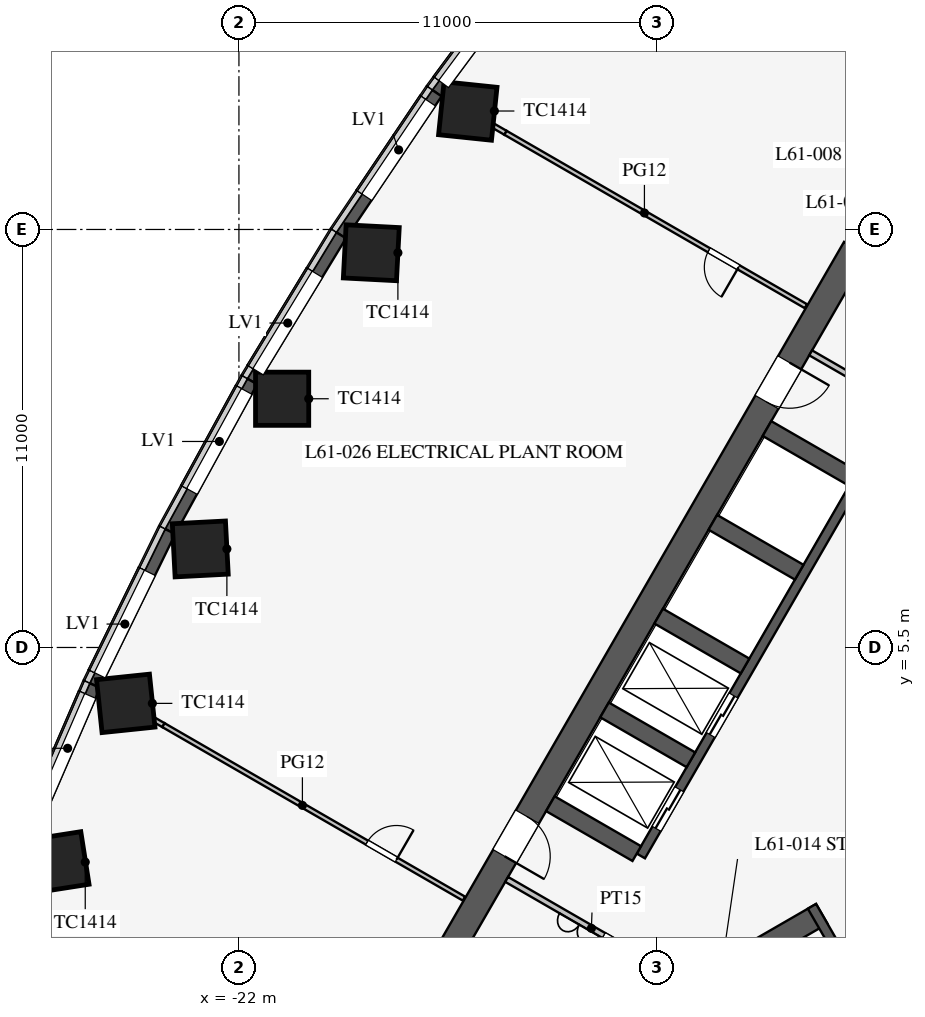
"""IFC4 building model, lengths in metres.
Left out: names, types, materials, properties, quantities, classifications, styles, units other than length and angle.
Written with IfcOpenShell. Run it as: python <this file> out.ifc"""

import sys

from ifc_helpers import new_model, si_unit, direction, frame, frame_2d, origin, origin_2d, place, context, subcontext, project, spatial, polyline, rectangle, outline, extrude, clip, halfspace, element, fill, save


model = new_model("IFC4")
c1 = context("Model", 3, precision=1e-05, world=origin(), true_north=direction((0.0, 1.0)))
c2 = subcontext(c1, "Body", "Model", "MODEL_VIEW")
j1 = project(units=[si_unit("LENGTHUNIT", "METRE"), si_unit("PLANEANGLEUNIT", "RADIAN")], contexts=[c1])
p1 = place(None, origin())
s1 = spatial("IfcSite", under=j1, at=p1, CompositionType="ELEMENT")
p2 = place(p1, origin())
s2 = spatial("IfcBuilding", under=s1, at=p2, CompositionType="ELEMENT")
p3 = place(p2, frame((0.0, 0.0, 265.3)))
s3 = spatial("IfcBuildingStorey", under=s2, at=p3, CompositionType="ELEMENT", Elevation=265.3)
p4 = place(p3, frame((-16.227, 19.761, 0.0), z_axis=(0.201282046639, -0.116233851942, 0.972612579275), x_axis=(-0.584672708009, -0.810911567532, 0.024088465132)))
e1 = element("IfcColumn", 1, at=p4, inside=s3, PredefinedType="COLUMN", context=c2, shape_type="Clipping", body=[
    clip(clip(extrude(rectangle(XDim=1.4, YDim=1.4, at=origin_2d()), origin(), (0.0, 0.0, 1.0), 6.169), halfspace(frame((0.0, 0.0, 0.185), z_axis=(-1.9384733546467386e-05, -1.123718108159144e-05, 0.999999999748979), x_axis=(0.0, 0.999999999936863, 1.1237181083702726e-05)), True)), halfspace(frame((0.0, 0.0, 5.984), z_axis=(1.9384733546467386e-05, 1.123718108159144e-05, -0.999999999748979), x_axis=(0.0, -0.999999999936863, -1.1237181083702726e-05)), True)),
])
p5 = place(p3, frame((-18.748, 16.02, 0.0), z_axis=(0.187766955789, -0.108401950994, 0.976213392315), x_axis=(-0.543261997309, -0.839487539175, 0.01127270373)))
e2 = element("IfcColumn", 2, at=p5, inside=s3, PredefinedType="COLUMN", context=c2, shape_type="Clipping", body=[
    clip(clip(extrude(rectangle(XDim=1.4, YDim=1.4, at=origin_2d()), origin(), (0.0, 0.0, 1.0), 6.146), halfspace(frame((0.0, 0.0, 0.164), z_axis=(5.122421756978066e-06, -9.263174689327915e-06, 0.9999999999439773), x_axis=(0.0, 0.9999999999570969, 9.263174689449444e-06)), True)), halfspace(frame((0.0, 0.0, 5.982), z_axis=(-5.122421756978066e-06, 9.263174689327915e-06, -0.9999999999439773), x_axis=(0.0, -0.9999999999570969, -9.263174689449444e-06)), True)),
])
p6 = place(p3, frame((-21.088, 12.175, 0.0), z_axis=(0.183254498096, -0.105784931626, 0.977357323177), x_axis=(-0.499939380126, -0.866060399857, 0.0)))
e3 = element("IfcColumn", 3, at=p6, inside=s3, PredefinedType="COLUMN", context=c2, shape_type="Clipping", body=[
    clip(clip(extrude(rectangle(XDim=1.4, YDim=1.4, at=origin_2d()), origin(), (0.0, 0.0, 1.0), 6.139), halfspace(frame((0.0, 0.0, 0.153), z_axis=(1.4810932677108633e-05, 8.35661905923546e-06, 0.9999999998554017), x_axis=(0.0, 0.9999999999650835, -8.356619060152029e-06)), True)), halfspace(frame((0.0, 0.0, 5.986), z_axis=(-1.4810932677108633e-05, -8.35661905923546e-06, -0.9999999998554017), x_axis=(0.0, -0.9999999999650835, 8.356619060152029e-06)), True)),
])
p7 = place(p3, frame((-23.248, 8.226, 0.0), z_axis=(0.187766955789, -0.108401950994, 0.976213392315), x_axis=(-0.4553484777, -0.890241927797, -0.01127270373)))
e4 = element("IfcColumn", 4, at=p7, inside=s3, PredefinedType="COLUMN", context=c2, shape_type="Clipping", body=[
    clip(clip(extrude(rectangle(XDim=1.4, YDim=1.4, at=origin_2d()), origin(), (0.0, 0.0, 1.0), 6.146), halfspace(frame((0.0, 0.0, 0.164), z_axis=(4.132789407884988e-06, -9.745032667568544e-06, 0.9999999999439773), x_axis=(0.0, 0.9999999999525172, 9.745032667651767e-06)), True)), halfspace(frame((0.0, 0.0, 5.982), z_axis=(-4.132789407884988e-06, 9.745032667568544e-06, -0.9999999999439773), x_axis=(0.0, -0.9999999999525172, -9.745032667651767e-06)), True)),
])
p8 = place(p3, frame((-25.227, 4.172, 0.0), z_axis=(0.201282046639, -0.116233851942, 0.972612579275), x_axis=(-0.410094064626, -0.911725070406, -0.024088465132)))
e5 = element("IfcColumn", 5, at=p8, inside=s3, PredefinedType="COLUMN", context=c2, shape_type="Clipping", body=[
    clip(clip(extrude(rectangle(XDim=1.4, YDim=1.4, at=origin_2d()), origin(), (0.0, 0.0, 1.0), 6.169), halfspace(frame((0.0, 0.0, 0.185), z_axis=(-2.1284951141970626e-05, -6.9994991401256534e-06, 0.999999999748979), x_axis=(0.0, 0.9999999999755035, 6.999499141711211e-06)), True)), halfspace(frame((0.0, 0.0, 5.984), z_axis=(2.1284951141970626e-05, 6.9994991401256534e-06, -0.999999999748979), x_axis=(0.0, -0.9999999999755035, -6.999499141711211e-06)), True)),
])
p9 = place(p3, frame((-27.022, 0.013, 0.0), z_axis=(0.223891049085, -0.129279785892, 0.96600182976), x_axis=(-0.364788927644, -0.930232982642, -0.03994541618)))
e6 = element("IfcColumn", 6, at=p9, inside=s3, PredefinedType="COLUMN", context=c2, shape_type="Clipping", body=[
    clip(clip(extrude(rectangle(XDim=1.4, YDim=1.4, at=origin_2d()), origin(), (0.0, 0.0, 1.0), 6.211), halfspace(frame((0.0, 0.0, 0.215), z_axis=(-1.7703553432418806e-05, -2.2252505130410105e-05, 0.9999999995957052), x_axis=(0.0, 0.999999999752413, 2.2252505133897248e-05)), True)), halfspace(frame((0.0, 0.0, 5.996), z_axis=(1.7703553432418806e-05, 2.2252505130410105e-05, -0.9999999995957052), x_axis=(0.0, -0.999999999752413, -2.2252505133897248e-05)), True)),
])
p10 = place(p3, frame((-5.773, 16.0, 0.0), z_axis=(0.0, 0.0, 1.0), x_axis=(-0.500002442456, -0.866023993627, 0.0)))
e7 = element("IfcWall", 7, at=p10, inside=s3, PredefinedType="SHEAR", context=c2, shape_type="SweptSolid", body=[
    extrude(rectangle(XDim=21.939, YDim=0.7, at=frame_2d((10.97, 0.0))), origin(), (0.0, 0.0, 1.0), 6.0),
])
p11 = place(p10, frame((17.27, 0.0, 0.0)))
e8 = element("IfcOpeningElement", 8, at=p11, cuts=e7, PredefinedType="OPENING", context=c2, shape_type="SweptSolid", body=[
    extrude(rectangle(XDim=1.2, YDim=2.1, at=frame_2d((0.6, 1.05))), frame((0.0, 0.36, 0.0), z_axis=(0.0, -1.0, 0.0), x_axis=(1.0, 0.0, 0.0)), (0.0, 0.0, 1.0), 0.72),
])
p12 = place(p10, frame((3.47, 0.0, 0.0)))
e9 = element("IfcOpeningElement", 9, at=p12, cuts=e7, PredefinedType="OPENING", context=c2, shape_type="SweptSolid", body=[
    extrude(rectangle(XDim=1.2, YDim=2.1, at=frame_2d((0.6, 1.05))), frame((0.0, 0.36, 0.0), z_axis=(0.0, -1.0, 0.0), x_axis=(1.0, 0.0, 0.0)), (0.0, 0.0, 1.0), 0.72),
])
p13 = place(p3, frame((-5.724, 9.886, 0.0), z_axis=(0.0, 0.0, 1.0), x_axis=(-0.500001763848, -0.866024385424, 0.0)))
e10 = element("IfcWall", 10, at=p13, inside=s3, PredefinedType="SHEAR", context=c2, shape_type="SweptSolid", body=[
    extrude(rectangle(XDim=11.4, YDim=0.25, at=frame_2d((5.7, 0.0))), origin(), (0.0, 0.0, 1.0), 6.0),
])
p14 = place(p13, frame((6.525, 0.0, 0.0)))
e11 = element("IfcOpeningElement", 11, at=p14, cuts=e10, PredefinedType="OPENING", context=c2, shape_type="SweptSolid", body=[
    extrude(rectangle(XDim=1.2, YDim=2.2, at=frame_2d((0.6, 1.1))), frame((0.0, 0.135, 0.0), z_axis=(0.0, -1.0, 0.0), x_axis=(1.0, 0.0, 0.0)), (0.0, 0.0, 1.0), 0.27),
])
p15 = place(p13, frame((9.375, 0.0, 0.0)))
e12 = element("IfcOpeningElement", 12, at=p15, cuts=e10, PredefinedType="OPENING", context=c2, shape_type="SweptSolid", body=[
    extrude(rectangle(XDim=1.2, YDim=2.2, at=frame_2d((0.6, 1.1))), frame((0.0, 0.135, 0.0), z_axis=(0.0, -1.0, 0.0), x_axis=(1.0, 0.0, 0.0)), (0.0, 0.0, 1.0), 0.27),
])
for number, where, z_axis, x_axis in (
    (13, (-5.832, 9.949, 0.0), (0.0, 0.0, 1.0), (-0.866, 0.5, 0.0)),
    (14, (-7.257, 7.481, 0.0), (0.0, 0.0, 1.0), (-0.866, 0.5, 0.0)),
    (15, (-8.682, 5.012, 0.0), (0.0, 0.0, 1.0), (-0.866, 0.5, 0.0)),
    (16, (-10.107, 2.544, 0.0), (0.0, 0.0, 1.0), (-0.866, 0.5, 0.0)),
    (17, (-11.532, 0.076, 0.0), (0.0, 0.0, 1.0), (-0.866, 0.5, 0.0)),
):
    element("IfcWall", number, at=place(p3, frame(where, z_axis=z_axis, x_axis=x_axis)), inside=s3, PredefinedType="SHEAR", context=c2, shape_type="SweptSolid", body=[
        extrude(rectangle(XDim=2.625, YDim=0.45, at=frame_2d((1.312, 0.0))), origin(), (0.0, 0.0, 1.0), 6.0),
    ])
p16 = place(p3, frame((-6.663, -1.509, 0.0), z_axis=(0.0, 0.0, 1.0), x_axis=(-0.866028310072, -0.499994966129, 0.0)))
e18 = element("IfcWall", 18, at=p16, inside=s3, PredefinedType="SHEAR", context=c2, shape_type="SweptSolid", body=[
    extrude(rectangle(XDim=9.125, YDim=0.6, at=frame_2d((4.562, 0.0))), origin(), (0.0, 0.0, 1.0), 6.0),
])
p17 = place(p3, frame((-6.922, -1.312, 0.0), z_axis=(0.0, 0.0, 1.0), x_axis=(0.499984536904, -0.866034331223, 0.0)))
e19 = element("IfcWall", 19, at=p17, inside=s3, PredefinedType="SHEAR", context=c2, shape_type="SweptSolid", body=[
    extrude(rectangle(XDim=4.65, YDim=0.25, at=frame_2d((2.325, 0.0))), origin(), (0.0, 0.0, 1.0), 6.0),
])
p18 = place(p17, frame((1.525, 0.0, 0.0)))
e20 = element("IfcOpeningElement", 20, at=p18, cuts=e19, PredefinedType="OPENING", context=c2, shape_type="SweptSolid", body=[
    extrude(rectangle(XDim=1.6, YDim=2.1, at=frame_2d((0.8, 1.05))), frame((0.0, 0.135, 0.0), z_axis=(0.0, -1.0, 0.0), x_axis=(1.0, 0.0, 0.0)), (0.0, 0.0, 1.0), 0.27),
])
p19 = place(p3, frame((-14.092, 23.724, 0.0), z_axis=(0.0, 0.0, 1.0), x_axis=(-0.596173167565, -0.802855873912, 0.0)))
e21 = element("IfcWall", 21, at=p19, inside=s3, PredefinedType="SOLIDWALL", context=c2, shape_type="SweptSolid", body=[
    extrude(rectangle(XDim=4.53, YDim=0.3, at=frame_2d((2.265, 0.0))), origin(), (0.0, 0.0, 1.0), 5.8),
])
p20 = place(p19, frame((1.23, 0.0, 3.5)))
e22 = element("IfcOpeningElement", 22, at=p20, cuts=e21, PredefinedType="OPENING", context=c2, shape_type="SweptSolid", body=[
    extrude(rectangle(XDim=3.0, YDim=2.0, at=frame_2d((1.5, 1.0))), frame((0.0, 0.16, 0.0), z_axis=(0.0, -1.0, 0.0), x_axis=(1.0, 0.0, 0.0)), (0.0, 0.0, 1.0), 0.32),
])
p21 = place(p3, frame((-16.792, 20.087, 0.0), z_axis=(0.0, 0.0, 1.0), x_axis=(-0.558466624917, -0.829526991034, 0.0)))
e23 = element("IfcWall", 23, at=p21, inside=s3, PredefinedType="SOLIDWALL", context=c2, shape_type="SweptSolid", body=[
    extrude(rectangle(XDim=4.511, YDim=0.3, at=frame_2d((2.255, 0.0))), origin(), (0.0, 0.0, 1.0), 5.8),
])
p22 = place(p21, frame((0.3, 0.0, 3.5)))
e24 = element("IfcOpeningElement", 24, at=p22, cuts=e23, PredefinedType="OPENING", context=c2, shape_type="SweptSolid", body=[
    extrude(rectangle(XDim=3.0, YDim=2.0, at=frame_2d((1.5, 1.0))), frame((0.0, 0.16, 0.0), z_axis=(0.0, -1.0, 0.0), x_axis=(1.0, 0.0, 0.0)), (0.0, 0.0, 1.0), 0.32),
])
p23 = place(p3, frame((-19.312, 16.346, 0.0), z_axis=(0.0, 0.0, 1.0), x_axis=(-0.519766265397, -0.854308509472, 0.0)))
e25 = element("IfcWall", 25, at=p23, inside=s3, PredefinedType="SOLIDWALL", context=c2, shape_type="SweptSolid", body=[
    extrude(rectangle(XDim=4.501, YDim=0.3, at=frame_2d((2.25, 0.0))), origin(), (0.0, 0.0, 1.0), 5.8),
])
p24 = place(p23, frame((1.201, 0.0, 3.5)))
e26 = element("IfcOpeningElement", 26, at=p24, cuts=e25, PredefinedType="OPENING", context=c2, shape_type="SweptSolid", body=[
    extrude(rectangle(XDim=3.0, YDim=2.0, at=frame_2d((1.5, 1.0))), frame((0.0, 0.16, 0.0), z_axis=(0.0, -1.0, 0.0), x_axis=(1.0, 0.0, 0.0)), (0.0, 0.0, 1.0), 0.32),
])
p25 = place(p3, frame((-21.651, 12.5, 0.0), z_axis=(0.0, 0.0, 1.0), x_axis=(-0.479972822547, -0.877283357654, 0.0)))
e27 = element("IfcWall", 27, at=p25, inside=s3, PredefinedType="SOLIDWALL", context=c2, shape_type="SweptSolid", body=[
    extrude(rectangle(XDim=4.501, YDim=0.3, at=frame_2d((2.25, 0.0))), origin(), (0.0, 0.0, 1.0), 5.8),
])
p26 = place(p25, frame((0.3, 0.0, 3.5)))
e28 = element("IfcOpeningElement", 28, at=p26, cuts=e27, PredefinedType="OPENING", context=c2, shape_type="SweptSolid", body=[
    extrude(rectangle(XDim=3.0, YDim=2.0, at=frame_2d((1.5, 1.0))), frame((0.0, 0.16, 0.0), z_axis=(0.0, -1.0, 0.0), x_axis=(1.0, 0.0, 0.0)), (0.0, 0.0, 1.0), 0.32),
])
p27 = place(p3, frame((-23.812, 8.552, 0.0), z_axis=(0.0, 0.0, 1.0), x_axis=(-0.439163535873, -0.898407139753, 0.0)))
e29 = element("IfcWall", 29, at=p27, inside=s3, PredefinedType="SOLIDWALL", context=c2, shape_type="SweptSolid", body=[
    extrude(rectangle(XDim=4.511, YDim=0.3, at=frame_2d((2.255, 0.0))), origin(), (0.0, 0.0, 1.0), 5.8),
])
p28 = place(p27, frame((1.211, 0.0, 3.5)))
e30 = element("IfcOpeningElement", 30, at=p28, cuts=e29, PredefinedType="OPENING", context=c2, shape_type="SweptSolid", body=[
    extrude(rectangle(XDim=3.0, YDim=2.0, at=frame_2d((1.5, 1.0))), frame((0.0, 0.16, 0.0), z_axis=(0.0, -1.0, 0.0), x_axis=(1.0, 0.0, 0.0)), (0.0, 0.0, 1.0), 0.32),
])
p29 = place(p3, frame((-25.792, 4.499, 0.0), z_axis=(0.0, 0.0, 1.0), x_axis=(-0.397208101111, -0.917728567939, 0.0)))
e31 = element("IfcWall", 31, at=p29, inside=s3, PredefinedType="SOLIDWALL", context=c2, shape_type="SweptSolid", body=[
    extrude(rectangle(XDim=4.53, YDim=0.3, at=frame_2d((2.265, 0.0))), origin(), (0.0, 0.0, 1.0), 5.8),
])
p30 = place(p29, frame((0.3, 0.0, 3.5)))
e32 = element("IfcOpeningElement", 32, at=p30, cuts=e31, PredefinedType="OPENING", context=c2, shape_type="SweptSolid", body=[
    extrude(rectangle(XDim=3.0, YDim=2.0, at=frame_2d((1.5, 1.0))), frame((0.0, 0.16, 0.0), z_axis=(0.0, -1.0, 0.0), x_axis=(1.0, 0.0, 0.0)), (0.0, 0.0, 1.0), 0.32),
])
p31 = place(p3, frame((-10.495, -3.178, 0.0), z_axis=(0.0, 0.0, 1.0), x_axis=(-0.866037967349, 0.499978238636, 0.0)))
e33 = element("IfcWall", 33, at=p31, inside=s3, PredefinedType="PARTITIONING", context=c2, shape_type="SweptSolid", body=[
    extrude(rectangle(XDim=5.15, YDim=0.15, at=frame_2d((2.575, 0.0))), origin(), (0.0, 0.0, 1.0), 5.8),
])
p32 = place(p31, frame((1.3, 0.0, 0.0)))
e34 = element("IfcOpeningElement", 34, at=p32, cuts=e33, PredefinedType="OPENING", context=c2, shape_type="SweptSolid", body=[
    extrude(rectangle(XDim=0.9, YDim=2.1, at=frame_2d((0.45, 1.05))), frame((0.0, 0.085, 0.0), z_axis=(0.0, -1.0, 0.0), x_axis=(1.0, 0.0, 0.0)), (0.0, 0.0, 1.0), 0.17),
])
p33 = place(p3, frame((-2.495, 10.678, 0.0), z_axis=(0.0, 0.0, 1.0), x_axis=(-0.866037967349, 0.499978238636, 0.0)))
e35 = element("IfcWall", 35, at=p33, inside=s3, PredefinedType="PARTITIONING", context=c2, shape_type="SweptSolid", body=[
    extrude(rectangle(XDim=5.15, YDim=0.15, at=frame_2d((2.575, 0.0))), origin(), (0.0, 0.0, 1.0), 5.8),
])
p34 = place(p33, frame((2.6, 0.0, 0.0)))
e36 = element("IfcOpeningElement", 36, at=p34, cuts=e35, PredefinedType="OPENING", context=c2, shape_type="SweptSolid", body=[
    extrude(rectangle(XDim=0.9, YDim=2.1, at=frame_2d((0.45, 1.05))), frame((0.0, 0.085, 0.0), z_axis=(0.0, -1.0, 0.0), x_axis=(1.0, 0.0, 0.0)), (0.0, 0.0, 1.0), 0.17),
])
p35 = place(p3, frame((-23.986, 3.456, 0.0), z_axis=(0.0, 0.0, 1.0), x_axis=(-0.866138304741, 0.499804398801, 0.0)))
e37 = element("IfcWall", 37, at=p35, inside=s3, PredefinedType="PARTITIONING", context=c2, shape_type="SweptSolid", body=[
    extrude(outline(polyline([(0.0, 0.0), (0.688, 0.0), (0.688, 0.05), (0.0, 2.9), (0.0, 0.0)])), frame((0.0, 0.06, 0.0), z_axis=(0.0, -1.0, 0.0), x_axis=(1.0, 0.0, 0.0)), (0.0, 0.0, 1.0), 0.12),
])
p36 = place(p3, frame((-14.986, 19.044, 0.0), z_axis=(0.0, 0.0, 1.0), x_axis=(-0.865984622623, 0.500070628392, 0.0)))
e38 = element("IfcWall", 38, at=p36, inside=s3, PredefinedType="PARTITIONING", context=c2, shape_type="SweptSolid", body=[
    extrude(outline(polyline([(0.0, 0.0), (0.688, 0.0), (0.688, 0.05), (0.0, 2.9), (0.0, 0.0)])), frame((0.0, 0.06, 0.0), z_axis=(0.0, -1.0, 0.0), x_axis=(1.0, 0.0, 0.0)), (0.0, 0.0, 1.0), 0.12),
])
p37 = place(p3, frame((-16.079, -1.109, 0.0), z_axis=(0.0, 0.0, 1.0), x_axis=(-0.866026165896, 0.499998679983, 0.0)))
e39 = element("IfcWall", 39, at=p37, inside=s3, PredefinedType="PARTITIONING", context=c2, shape_type="SweptSolid", body=[
    extrude(rectangle(XDim=9.13, YDim=0.12, at=frame_2d((4.565, 0.0))), origin(), (0.0, 0.0, 1.0), 2.9),
])
p38 = place(p37, frame((2.05, 0.0, 0.0)))
e40 = element("IfcOpeningElement", 40, at=p38, cuts=e39, PredefinedType="OPENING", context=c2, shape_type="SweptSolid", body=[
    extrude(rectangle(XDim=0.9, YDim=2.1, at=frame_2d((0.45, 1.05))), frame((0.0, 0.07, 0.0), z_axis=(0.0, -1.0, 0.0), x_axis=(1.0, 0.0, 0.0)), (0.0, 0.0, 1.0), 0.14),
])
p39 = place(p3, frame((-7.079, 14.479, 0.0), z_axis=(0.0, 0.0, 1.0), x_axis=(-0.866026165896, 0.499998679983, 0.0)))
e41 = element("IfcWall", 41, at=p39, inside=s3, PredefinedType="PARTITIONING", context=c2, shape_type="SweptSolid", body=[
    extrude(rectangle(XDim=9.13, YDim=0.12, at=frame_2d((4.565, 0.0))), origin(), (0.0, 0.0, 1.0), 2.9),
])
p40 = place(p39, frame((2.05, 0.0, 0.0)))
e42 = element("IfcOpeningElement", 42, at=p40, cuts=e41, PredefinedType="OPENING", context=c2, shape_type="SweptSolid", body=[
    extrude(rectangle(XDim=0.9, YDim=2.1, at=frame_2d((0.45, 1.05))), frame((0.0, 0.07, 0.0), z_axis=(0.0, -1.0, 0.0), x_axis=(1.0, 0.0, 0.0)), (0.0, 0.0, 1.0), 0.14),
])
p41 = place(p20, origin())
e43 = element("IfcWindow", 43, at=p41, inside=s3, PartitioningType="SINGLE_PANEL", PredefinedType="USERDEFINED", context=c2, shape_type="SweptSolid", body=[
    extrude(rectangle(XDim=3.0, YDim=2.0, at=frame_2d((1.5, 1.0))), frame((0.0, 0.03, 0.0), z_axis=(0.0, -1.0, 0.0), x_axis=(1.0, 0.0, 0.0)), (0.0, 0.0, 1.0), 0.06),
])
fill(e22, e43)
p42 = place(p22, origin())
e44 = element("IfcWindow", 44, at=p42, inside=s3, PartitioningType="SINGLE_PANEL", PredefinedType="USERDEFINED", context=c2, shape_type="SweptSolid", body=[
    extrude(rectangle(XDim=3.0, YDim=2.0, at=frame_2d((1.5, 1.0))), frame((0.0, 0.03, 0.0), z_axis=(0.0, -1.0, 0.0), x_axis=(1.0, 0.0, 0.0)), (0.0, 0.0, 1.0), 0.06),
])
fill(e24, e44)
p43 = place(p24, origin())
e45 = element("IfcWindow", 45, at=p43, inside=s3, PartitioningType="SINGLE_PANEL", PredefinedType="USERDEFINED", context=c2, shape_type="SweptSolid", body=[
    extrude(rectangle(XDim=3.0, YDim=2.0, at=frame_2d((1.5, 1.0))), frame((0.0, 0.03, 0.0), z_axis=(0.0, -1.0, 0.0), x_axis=(1.0, 0.0, 0.0)), (0.0, 0.0, 1.0), 0.06),
])
fill(e26, e45)
p44 = place(p26, origin())
e46 = element("IfcWindow", 46, at=p44, inside=s3, PartitioningType="SINGLE_PANEL", PredefinedType="USERDEFINED", context=c2, shape_type="SweptSolid", body=[
    extrude(rectangle(XDim=3.0, YDim=2.0, at=frame_2d((1.5, 1.0))), frame((0.0, 0.03, 0.0), z_axis=(0.0, -1.0, 0.0), x_axis=(1.0, 0.0, 0.0)), (0.0, 0.0, 1.0), 0.06),
])
fill(e28, e46)
p45 = place(p28, origin())
e47 = element("IfcWindow", 47, at=p45, inside=s3, PartitioningType="SINGLE_PANEL", PredefinedType="USERDEFINED", context=c2, shape_type="SweptSolid", body=[
    extrude(rectangle(XDim=3.0, YDim=2.0, at=frame_2d((1.5, 1.0))), frame((0.0, 0.03, 0.0), z_axis=(0.0, -1.0, 0.0), x_axis=(1.0, 0.0, 0.0)), (0.0, 0.0, 1.0), 0.06),
])
fill(e30, e47)
p46 = place(p30, origin())
e48 = element("IfcWindow", 48, at=p46, inside=s3, PartitioningType="SINGLE_PANEL", PredefinedType="USERDEFINED", context=c2, shape_type="SweptSolid", body=[
    extrude(rectangle(XDim=3.0, YDim=2.0, at=frame_2d((1.5, 1.0))), frame((0.0, 0.03, 0.0), z_axis=(0.0, -1.0, 0.0), x_axis=(1.0, 0.0, 0.0)), (0.0, 0.0, 1.0), 0.06),
])
fill(e32, e48)
p47 = place(p32, origin())
e49 = element("IfcDoor", 49, at=p47, inside=s3, OperationType="SINGLE_SWING_LEFT", PredefinedType="DOOR", context=c2, shape_type="SweptSolid", body=[
    extrude(rectangle(XDim=0.9, YDim=2.1, at=frame_2d((0.45, 1.05))), frame((0.0, 0.025, 0.0), z_axis=(0.0, -1.0, 0.0), x_axis=(1.0, 0.0, 0.0)), (0.0, 0.0, 1.0), 0.05),
])
fill(e34, e49)
p48 = place(p11, origin())
e50 = element("IfcDoor", 50, at=p48, inside=s3, OperationType="SINGLE_SWING_RIGHT", PredefinedType="DOOR", context=c2, shape_type="SweptSolid", body=[
    extrude(rectangle(XDim=1.2, YDim=2.1, at=frame_2d((0.6, 1.05))), frame((0.0, 0.025, 0.0), z_axis=(0.0, -1.0, 0.0), x_axis=(1.0, 0.0, 0.0)), (0.0, 0.0, 1.0), 0.05),
])
fill(e8, e50)
p49 = place(p12, origin())
e51 = element("IfcDoor", 51, at=p49, inside=s3, OperationType="SINGLE_SWING_LEFT", PredefinedType="DOOR", context=c2, shape_type="SweptSolid", body=[
    extrude(rectangle(XDim=1.2, YDim=2.1, at=frame_2d((0.6, 1.05))), frame((0.0, 0.025, 0.0), z_axis=(0.0, -1.0, 0.0), x_axis=(1.0, 0.0, 0.0)), (0.0, 0.0, 1.0), 0.05),
])
fill(e9, e51)
p50 = place(p38, frame((0.9, 0.0, 0.0), z_axis=(0.0, 0.0, 1.0), x_axis=(-1.0, 0.0, 0.0)))
e52 = element("IfcDoor", 52, at=p50, inside=s3, OperationType="SINGLE_SWING_RIGHT", PredefinedType="DOOR", context=c2, shape_type="SweptSolid", body=[
    extrude(rectangle(XDim=0.9, YDim=2.1, at=frame_2d((0.45, 1.05))), frame((0.0, 0.025, 0.0), z_axis=(0.0, -1.0, 0.0), x_axis=(1.0, 0.0, 0.0)), (0.0, 0.0, 1.0), 0.05),
])
fill(e40, e52)
p51 = place(p40, origin())
e53 = element("IfcDoor", 53, at=p51, inside=s3, OperationType="SINGLE_SWING_LEFT", PredefinedType="DOOR", context=c2, shape_type="SweptSolid", body=[
    extrude(rectangle(XDim=0.9, YDim=2.1, at=frame_2d((0.45, 1.05))), frame((0.0, 0.025, 0.0), z_axis=(0.0, -1.0, 0.0), x_axis=(1.0, 0.0, 0.0)), (0.0, 0.0, 1.0), 0.05),
])
fill(e42, e53)
p52 = place(p14, origin())
e54 = element("IfcDoor", 54, at=p52, inside=s3, OperationType="DOUBLE_DOOR_SLIDING", PredefinedType="DOOR", context=c2, shape_type="SweptSolid", body=[
    extrude(rectangle(XDim=1.2, YDim=2.2, at=frame_2d((0.6, 1.1))), frame((0.0, 0.025, 0.0), z_axis=(0.0, -1.0, 0.0), x_axis=(1.0, 0.0, 0.0)), (0.0, 0.0, 1.0), 0.05),
])
fill(e11, e54)
p53 = place(p15, origin())
e55 = element("IfcDoor", 55, at=p53, inside=s3, OperationType="DOUBLE_DOOR_SLIDING", PredefinedType="DOOR", context=c2, shape_type="SweptSolid", body=[
    extrude(rectangle(XDim=1.2, YDim=2.2, at=frame_2d((0.6, 1.1))), frame((0.0, 0.025, 0.0), z_axis=(0.0, -1.0, 0.0), x_axis=(1.0, 0.0, 0.0)), (0.0, 0.0, 1.0), 0.05),
])
fill(e12, e55)
save(model, sys.argv[1])
